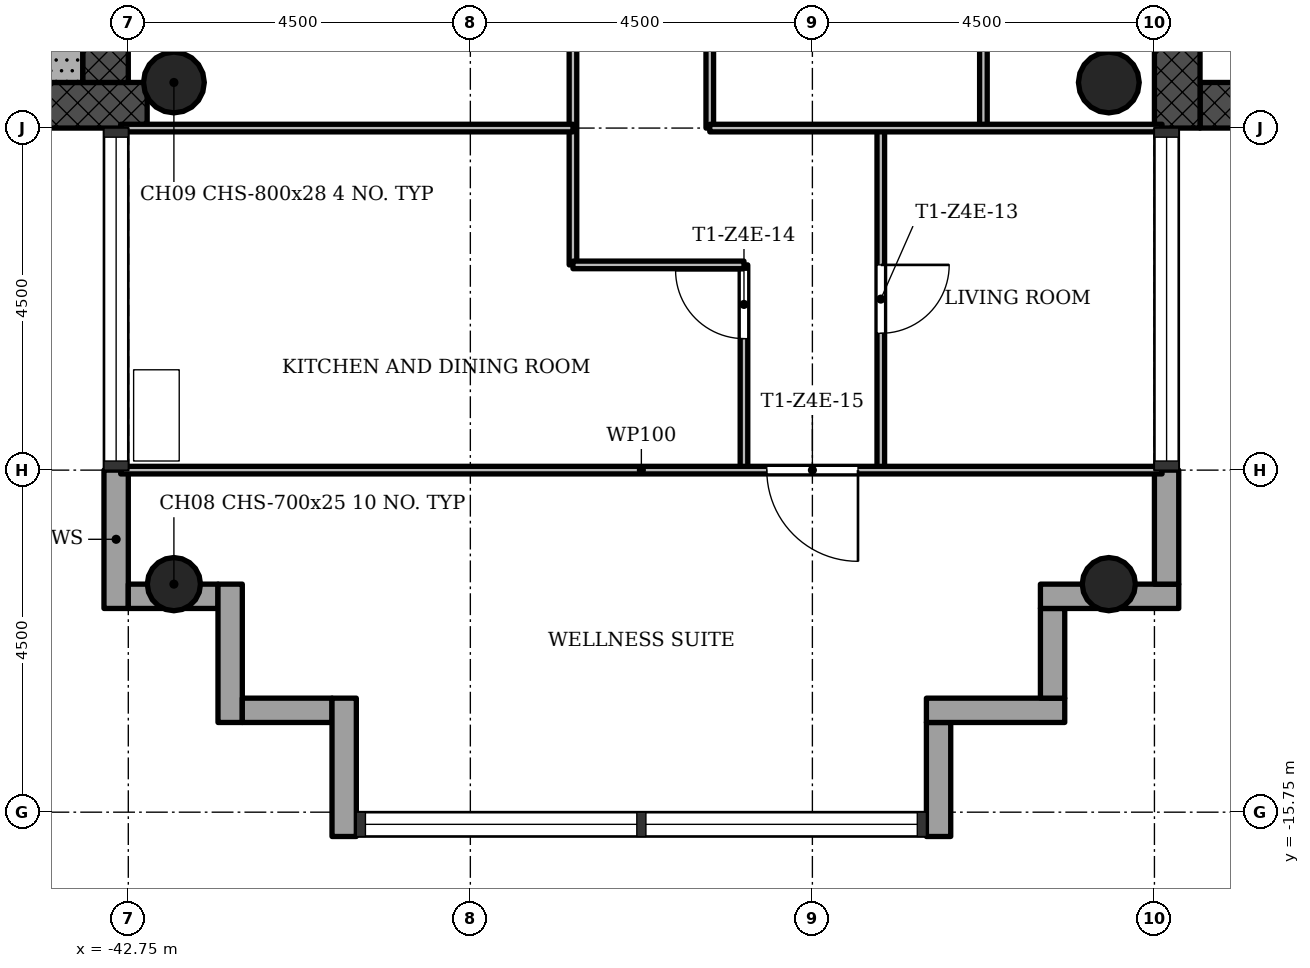
"""IFC4 building model, lengths in metres.
Left out: names, types, materials, properties, quantities, classifications, styles, units other than length and angle.
Written with IfcOpenShell. Run it as: python <this file> out.ifc"""

import sys

from ifc_helpers import new_model, si_unit, direction, frame, frame_2d, origin, origin_2d, place, context, subcontext, project, spatial, rectangle, hollow_circle, extrude, element, fill, save


model = new_model("IFC4")
c1 = context("Model", 3, precision=1e-05, world=origin(), true_north=direction((0.0, 1.0)))
c2 = subcontext(c1, "Body", "Model", "MODEL_VIEW")
j1 = project(units=[si_unit("LENGTHUNIT", "METRE"), si_unit("PLANEANGLEUNIT", "RADIAN")], contexts=[c1])
p1 = place(None, origin())
s1 = spatial("IfcSite", under=j1, at=p1, CompositionType="ELEMENT")
p2 = place(p1, origin())
s2 = spatial("IfcBuilding", under=s1, at=p2, CompositionType="ELEMENT")
p3 = place(p2, frame((0.0, 0.0, 206.2)))
s3 = spatial("IfcBuildingStorey", under=s2, at=p3, CompositionType="ELEMENT", Elevation=206.2)
p4 = place(p3, frame((-28.65, -6.45, 0.0), z_axis=(0.0, 0.0, 1.0), x_axis=(1.0, 0.0, 0.0)))
e1 = element("IfcWall", 1, at=p4, inside=s3, PredefinedType="SHEAR", context=c2, shape_type="SweptSolid", body=[
    extrude(rectangle(XDim=8.4, YDim=0.6, at=frame_2d((4.2, 0.0))), origin(), (0.0, 0.0, 1.0), 3.4),
])
p5 = place(p3, frame((-28.95, 6.15, 0.0), z_axis=(0.0, 0.0, 1.0), x_axis=(0.0, -1.0, 0.0)))
e2 = element("IfcWall", 2, at=p5, inside=s3, PredefinedType="SHEAR", context=c2, shape_type="SweptSolid", body=[
    extrude(rectangle(XDim=12.9, YDim=0.6, at=frame_2d((6.45, 0.0))), origin(), (0.0, 0.0, 1.0), 3.4),
])
p6 = place(p5, frame((5.25, 0.0, 0.0)))
e3 = element("IfcOpeningElement", 3, at=p6, cuts=e2, PredefinedType="OPENING", context=c2, shape_type="SweptSolid", body=[
    extrude(rectangle(XDim=1.8, YDim=2.1, at=frame_2d((0.9, 1.05))), frame((0.0, 0.31, 0.0), z_axis=(0.0, -1.0, 0.0), x_axis=(1.0, 0.0, 0.0)), (0.0, 0.0, 1.0), 0.62),
])
p7 = place(p3, frame((-51.15, -6.45, 0.0), z_axis=(0.0, 0.0, 1.0), x_axis=(1.0, 0.0, 0.0)))
e4 = element("IfcWall", 4, at=p7, inside=s3, PredefinedType="SHEAR", context=c2, shape_type="SweptSolid", body=[
    extrude(rectangle(XDim=8.648, YDim=0.6, at=frame_2d((4.324, 0.0))), origin(), (0.0, 0.0, 1.0), 3.4),
])
p8 = place(p3, frame((-43.05, -6.15, 0.0), z_axis=(0.0, 0.0, 1.0), x_axis=(0.0, 1.0, 0.0)))
e5 = element("IfcWall", 5, at=p8, inside=s3, PredefinedType="SHEAR", context=c2, shape_type="SweptSolid", body=[
    extrude(rectangle(XDim=12.9, YDim=0.6, at=frame_2d((6.45, 0.0))), origin(), (0.0, 0.0, 1.0), 3.4),
])
p9 = place(p8, frame((5.25, 0.0, 0.0)))
e6 = element("IfcOpeningElement", 6, at=p9, cuts=e5, PredefinedType="OPENING", context=c2, shape_type="SweptSolid", body=[
    extrude(rectangle(XDim=1.8, YDim=2.1, at=frame_2d((0.9, 1.05))), frame((0.0, 0.31, 0.0), z_axis=(0.0, -1.0, 0.0), x_axis=(1.0, 0.0, 0.0)), (0.0, 0.0, 1.0), 0.62),
])
for number, where, z_axis, x_axis in (
    (7, (-42.15, -12.75, 0.0), (0.0, 0.0, 1.0), (1.0, 0.0, 0.0)),
    (8, (-29.85, -12.75, 0.0), (0.0, 0.0, 1.0), (1.0, 0.0, 0.0)),
):
    element("IfcColumn", number, at=place(p3, frame(where, z_axis=z_axis, x_axis=x_axis)), inside=s3, PredefinedType="COLUMN", context=c2, shape_type="SweptSolid", body=[
        extrude(hollow_circle(Radius=0.35, WallThickness=0.025, at=origin_2d()), origin(), (0.0, 0.0, 1.0), 3.4),
    ])
for number, where, z_axis, x_axis in (
    (9, (-42.15, -6.15, 0.0), (0.0, 0.0, 1.0), (1.0, 0.0, 0.0)),
    (10, (-29.85, -6.15, 0.0), (0.0, 0.0, 1.0), (1.0, 0.0, 0.0)),
):
    element("IfcColumn", number, at=place(p3, frame(where, z_axis=z_axis, x_axis=x_axis)), inside=s3, PredefinedType="COLUMN", context=c2, shape_type="SweptSolid", body=[
        extrude(hollow_circle(Radius=0.4, WallThickness=0.028, at=origin_2d()), origin(), (0.0, 0.0, 1.0), 3.4),
    ])
p10 = place(p3, frame((-42.91, -11.25, -0.3), z_axis=(0.0, 0.0, 1.0), x_axis=(0.0, -1.0, 0.0)))
e11 = element("IfcWall", 11, at=p10, inside=s3, PredefinedType="STANDARD", context=c2, shape_type="SweptSolid", body=[
    extrude(rectangle(XDim=1.82, YDim=0.32, at=frame_2d((0.91, 0.0))), origin(), (0.0, 0.0, 1.0), 3.4),
])
p11 = place(p3, frame((-42.75, -12.91, -0.3), z_axis=(0.0, 0.0, 1.0), x_axis=(1.0, 0.0, 0.0)))
e12 = element("IfcWall", 12, at=p11, inside=s3, PredefinedType="STANDARD", context=c2, shape_type="SweptSolid", body=[
    extrude(rectangle(XDim=1.18, YDim=0.32, at=frame_2d((0.59, 0.0))), origin(), (0.0, 0.0, 1.0), 3.4),
])
p12 = place(p3, frame((-41.41, -12.75, -0.3), z_axis=(0.0, 0.0, 1.0), x_axis=(0.0, -1.0, 0.0)))
e13 = element("IfcWall", 13, at=p12, inside=s3, PredefinedType="STANDARD", context=c2, shape_type="SweptSolid", body=[
    extrude(rectangle(XDim=1.82, YDim=0.32, at=frame_2d((0.91, 0.0))), origin(), (0.0, 0.0, 1.0), 3.4),
])
p13 = place(p3, frame((-41.25, -14.41, -0.3), z_axis=(0.0, 0.0, 1.0), x_axis=(1.0, 0.0, 0.0)))
e14 = element("IfcWall", 14, at=p13, inside=s3, PredefinedType="STANDARD", context=c2, shape_type="SweptSolid", body=[
    extrude(rectangle(XDim=1.18, YDim=0.32, at=frame_2d((0.59, 0.0))), origin(), (0.0, 0.0, 1.0), 3.4),
])
p14 = place(p3, frame((-39.91, -14.25, -0.3), z_axis=(0.0, 0.0, 1.0), x_axis=(0.0, -1.0, 0.0)))
e15 = element("IfcWall", 15, at=p14, inside=s3, PredefinedType="STANDARD", context=c2, shape_type="SweptSolid", body=[
    extrude(rectangle(XDim=1.82, YDim=0.32, at=frame_2d((0.91, 0.0))), origin(), (0.0, 0.0, 1.0), 3.4),
])
p15 = place(p3, frame((-32.09, -16.07, -0.3), z_axis=(0.0, 0.0, 1.0), x_axis=(0.0, 1.0, 0.0)))
e16 = element("IfcWall", 16, at=p15, inside=s3, PredefinedType="STANDARD", context=c2, shape_type="SweptSolid", body=[
    extrude(rectangle(XDim=1.5, YDim=0.32, at=frame_2d((0.75, 0.0))), origin(), (0.0, 0.0, 1.0), 3.4),
])
p16 = place(p3, frame((-32.25, -14.41, -0.3), z_axis=(0.0, 0.0, 1.0), x_axis=(1.0, 0.0, 0.0)))
e17 = element("IfcWall", 17, at=p16, inside=s3, PredefinedType="STANDARD", context=c2, shape_type="SweptSolid", body=[
    extrude(rectangle(XDim=1.82, YDim=0.32, at=frame_2d((0.91, 0.0))), origin(), (0.0, 0.0, 1.0), 3.4),
])
p17 = place(p3, frame((-30.59, -14.25, -0.3), z_axis=(0.0, 0.0, 1.0), x_axis=(0.0, 1.0, 0.0)))
e18 = element("IfcWall", 18, at=p17, inside=s3, PredefinedType="STANDARD", context=c2, shape_type="SweptSolid", body=[
    extrude(rectangle(XDim=1.18, YDim=0.32, at=frame_2d((0.59, 0.0))), origin(), (0.0, 0.0, 1.0), 3.4),
])
p18 = place(p3, frame((-30.75, -12.91, -0.3), z_axis=(0.0, 0.0, 1.0), x_axis=(1.0, 0.0, 0.0)))
e19 = element("IfcWall", 19, at=p18, inside=s3, PredefinedType="STANDARD", context=c2, shape_type="SweptSolid", body=[
    extrude(rectangle(XDim=1.82, YDim=0.32, at=frame_2d((0.91, 0.0))), origin(), (0.0, 0.0, 1.0), 3.4),
])
p19 = place(p3, frame((-29.09, -12.75, -0.3), z_axis=(0.0, 0.0, 1.0), x_axis=(0.0, 1.0, 0.0)))
e20 = element("IfcWall", 20, at=p19, inside=s3, PredefinedType="STANDARD", context=c2, shape_type="SweptSolid", body=[
    extrude(rectangle(XDim=1.5, YDim=0.32, at=frame_2d((0.75, 0.0))), origin(), (0.0, 0.0, 1.0), 3.4),
])
p20 = place(p3, frame((-36.9, -8.55, 0.0), z_axis=(0.0, 0.0, 1.0), x_axis=(0.0, 1.0, 0.0)))
e21 = element("IfcWall", 21, at=p20, inside=s3, PredefinedType="PARTITIONING", context=c2, shape_type="SweptSolid", body=[
    extrude(rectangle(XDim=4.05, YDim=0.1, at=frame_2d((2.025, 0.0))), origin(), (0.0, 0.0, 1.0), 3.0),
])
p21 = place(p3, frame((-35.1, -6.75, 0.0), z_axis=(0.0, 0.0, 1.0), x_axis=(0.0, 1.0, 0.0)))
e22 = element("IfcWall", 22, at=p21, inside=s3, PredefinedType="PARTITIONING", context=c2, shape_type="SweptSolid", body=[
    extrude(rectangle(XDim=2.25, YDim=0.1, at=frame_2d((1.125, 0.0))), origin(), (0.0, 0.0, 1.0), 3.0),
])
p22 = place(p3, frame((-34.65, -11.25, 0.0), z_axis=(0.0, 0.0, 1.0), x_axis=(0.0, 1.0, 0.0)))
e23 = element("IfcWall", 23, at=p22, inside=s3, PredefinedType="PARTITIONING", context=c2, shape_type="SweptSolid", body=[
    extrude(rectangle(XDim=2.7, YDim=0.1, at=frame_2d((1.35, 0.0))), origin(), (0.0, 0.0, 1.0), 3.0),
])
p23 = place(p22, frame((1.73, 0.0, 0.0)))
e24 = element("IfcOpeningElement", 24, at=p23, cuts=e23, PredefinedType="OPENING", context=c2, shape_type="SweptSolid", body=[
    extrude(rectangle(XDim=0.9, YDim=2.1, at=frame_2d((0.45, 1.05))), frame((0.0, 0.06, 0.0), z_axis=(0.0, -1.0, 0.0), x_axis=(1.0, 0.0, 0.0)), (0.0, 0.0, 1.0), 0.12),
])
p24 = place(p3, frame((-32.85, -11.25, 0.0), z_axis=(0.0, 0.0, 1.0), x_axis=(0.0, 1.0, 0.0)))
e25 = element("IfcWall", 25, at=p24, inside=s3, PredefinedType="PARTITIONING", context=c2, shape_type="SweptSolid", body=[
    extrude(rectangle(XDim=4.5, YDim=0.1, at=frame_2d((2.25, 0.0))), origin(), (0.0, 0.0, 1.0), 3.0),
])
p25 = place(p24, frame((1.8, 0.0, 0.0)))
e26 = element("IfcOpeningElement", 26, at=p25, cuts=e25, PredefinedType="OPENING", context=c2, shape_type="SweptSolid", body=[
    extrude(rectangle(XDim=0.9, YDim=2.1, at=frame_2d((0.45, 1.05))), frame((0.0, 0.06, 0.0), z_axis=(0.0, -1.0, 0.0), x_axis=(1.0, 0.0, 0.0)), (0.0, 0.0, 1.0), 0.12),
])
p26 = place(p3, frame((-31.5, -6.75, 0.0), z_axis=(0.0, 0.0, 1.0), x_axis=(0.0, 1.0, 0.0)))
e27 = element("IfcWall", 27, at=p26, inside=s3, PredefinedType="PARTITIONING", context=c2, shape_type="SweptSolid", body=[
    extrude(rectangle(XDim=5.25, YDim=0.1, at=frame_2d((2.625, 0.0))), origin(), (0.0, 0.0, 1.0), 3.0),
])
p27 = place(p26, frame((3.3, 0.0, 0.0)))
e28 = element("IfcOpeningElement", 28, at=p27, cuts=e27, PredefinedType="OPENING", context=c2, shape_type="SweptSolid", body=[
    extrude(rectangle(XDim=0.9, YDim=2.1, at=frame_2d((0.45, 1.05))), frame((0.0, 0.06, 0.0), z_axis=(0.0, -1.0, 0.0), x_axis=(1.0, 0.0, 0.0)), (0.0, 0.0, 1.0), 0.12),
])
p28 = place(p3, frame((-42.85, -11.25, 0.0), z_axis=(0.0, 0.0, 1.0), x_axis=(1.0, 0.0, 0.0)))
e29 = element("IfcWall", 29, at=p28, inside=s3, PredefinedType="PARTITIONING", context=c2, shape_type="SweptSolid", body=[
    extrude(rectangle(XDim=13.7, YDim=0.1, at=frame_2d((6.85, 0.0))), origin(), (0.0, 0.0, 1.0), 3.0),
])
p29 = place(p28, frame((8.5, 0.0, 0.0)))
e30 = element("IfcOpeningElement", 30, at=p29, cuts=e29, PredefinedType="OPENING", context=c2, shape_type="SweptSolid", body=[
    extrude(rectangle(XDim=1.2, YDim=2.1, at=frame_2d((0.6, 1.05))), frame((0.0, 0.06, 0.0), z_axis=(0.0, -1.0, 0.0), x_axis=(1.0, 0.0, 0.0)), (0.0, 0.0, 1.0), 0.12),
])
p30 = place(p3, frame((-36.9, -8.55, 0.0), z_axis=(0.0, 0.0, 1.0), x_axis=(1.0, 0.0, 0.0)))
e31 = element("IfcWall", 31, at=p30, inside=s3, PredefinedType="PARTITIONING", context=c2, shape_type="SweptSolid", body=[
    extrude(rectangle(XDim=2.25, YDim=0.1, at=frame_2d((1.125, 0.0))), origin(), (0.0, 0.0, 1.0), 3.0),
])
for number, where, z_axis, x_axis in (
    (32, (-42.85, -6.75, 0.0), (0.0, 0.0, 1.0), (1.0, 0.0, 0.0)),
    (33, (-35.1, -6.75, 0.0), (0.0, 0.0, 1.0), (1.0, 0.0, 0.0)),
):
    element("IfcWall", number, at=place(p3, frame(where, z_axis=z_axis, x_axis=x_axis)), inside=s3, PredefinedType="PARTITIONING", context=c2, shape_type="SweptSolid", body=[
        extrude(rectangle(XDim=5.95, YDim=0.1, at=frame_2d((2.975, 0.0))), origin(), (0.0, 0.0, 1.0), 3.0),
    ])
p31 = place(p3, frame((-43.65, -1.85, 0.0), z_axis=(0.0, 0.0, 1.0), x_axis=(0.0, -1.0, 0.0)))
e34 = element("IfcWall", 34, at=p31, inside=s3, PredefinedType="SHEAR", context=c2, shape_type="SweptSolid", body=[
    extrude(rectangle(XDim=4.3, YDim=0.6, at=frame_2d((2.15, 0.0))), origin(), (0.0, 0.0, 1.0), 3.4),
])
p32 = place(p25, origin())
e35 = element("IfcDoor", 35, at=p32, inside=s3, OperationType="SINGLE_SWING_RIGHT", PredefinedType="DOOR", context=c2, shape_type="SweptSolid", body=[
    extrude(rectangle(XDim=0.9, YDim=2.1, at=frame_2d((0.45, 1.05))), frame((0.0, 0.025, 0.0), z_axis=(0.0, -1.0, 0.0), x_axis=(1.0, 0.0, 0.0)), (0.0, 0.0, 1.0), 0.05),
])
fill(e26, e35)
p33 = place(p23, origin())
e36 = element("IfcDoor", 36, at=p33, inside=s3, OperationType="SINGLE_SWING_LEFT", PredefinedType="DOOR", context=c2, shape_type="SweptSolid", body=[
    extrude(rectangle(XDim=0.9, YDim=2.1, at=frame_2d((0.45, 1.05))), frame((0.0, 0.025, 0.0), z_axis=(0.0, -1.0, 0.0), x_axis=(1.0, 0.0, 0.0)), (0.0, 0.0, 1.0), 0.05),
])
fill(e24, e36)
p34 = place(p29, origin())
e37 = element("IfcDoor", 37, at=p34, inside=s3, OperationType="SINGLE_SWING_RIGHT", PredefinedType="DOOR", context=c2, shape_type="SweptSolid", body=[
    extrude(rectangle(XDim=1.2, YDim=2.1, at=frame_2d((0.6, 1.05))), frame((0.0, 0.025, 0.0), z_axis=(0.0, -1.0, 0.0), x_axis=(1.0, 0.0, 0.0)), (0.0, 0.0, 1.0), 0.05),
])
fill(e30, e37)
save(model, sys.argv[1])
